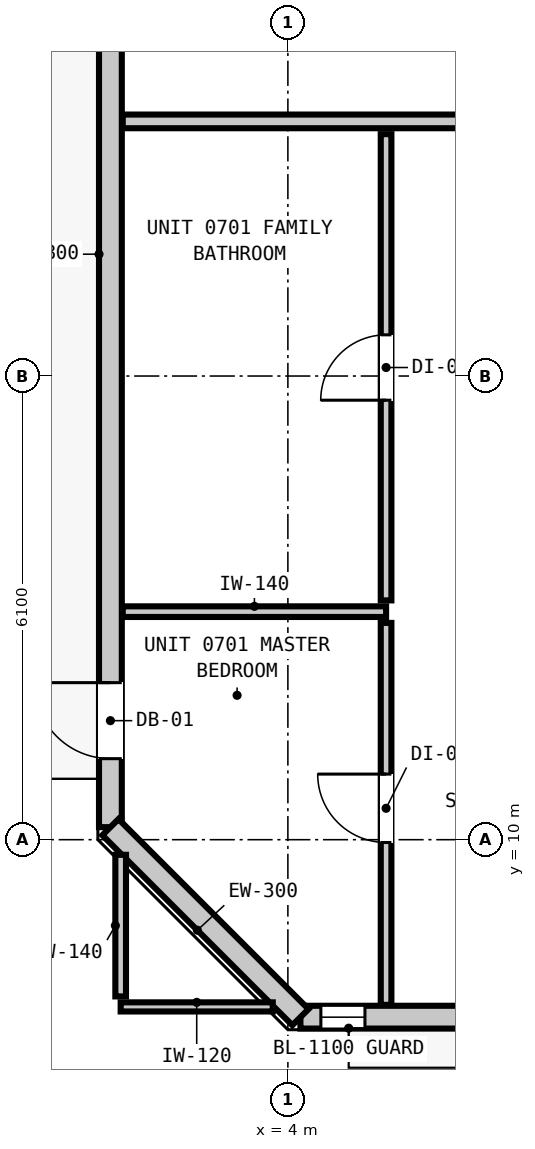
"""IFC4 building model, lengths in metres.
Left out: names, types, materials, properties, quantities, classifications, styles, units other than length and angle.
Written with IfcOpenShell. Run it as: python <this file> out.ifc"""

import sys

from ifc_helpers import new_model, si_unit, direction, frame, frame_2d, origin, place, context, subcontext, project, spatial, rectangle, extrude, element, fill, save


model = new_model("IFC4")
c1 = context("Model", 3, precision=1e-05, world=origin(), true_north=direction((0.0, 1.0)))
c2 = subcontext(c1, "Body", "Model", "MODEL_VIEW")
j1 = project(units=[si_unit("LENGTHUNIT", "METRE"), si_unit("PLANEANGLEUNIT", "RADIAN")], contexts=[c1])
p1 = place(None, origin())
s1 = spatial("IfcSite", under=j1, at=p1, CompositionType="ELEMENT")
p2 = place(p1, origin())
s2 = spatial("IfcBuilding", under=s1, at=p2, CompositionType="ELEMENT")
p3 = place(p2, frame((0.0, 0.0, 28.64)))
s3 = spatial("IfcBuildingStorey", under=s2, at=p3, CompositionType="ELEMENT", Elevation=28.64)
p4 = place(p3, frame((1.665, 10.165, 0.0), z_axis=(0.0, 0.0, 1.0), x_axis=(0.0, 1.0, 0.0)))
e1 = element("IfcWall", 1, at=p4, inside=s3, PredefinedType="STANDARD", context=c2, shape_type="SweptSolid", body=[
    extrude(rectangle(XDim=34.67, YDim=0.3, at=frame_2d((17.335, 0.0))), origin(), (0.0, 0.0, 1.0), 3.06),
])
p5 = place(p4, frame((0.901, 0.0, 0.0)))
e2 = element("IfcOpeningElement", 2, at=p5, cuts=e1, PredefinedType="OPENING", context=c2, shape_type="SweptSolid", body=[
    extrude(rectangle(XDim=1.0, YDim=2.15, at=frame_2d((0.5, 1.075))), frame((0.0, 0.16, 0.0), z_axis=(0.0, -1.0, 0.0), x_axis=(1.0, 0.0, 0.0)), (0.0, 0.0, 1.0), 0.32),
])
p6 = place(p4, frame((17.025, 0.0, 0.85)))
e3 = element("IfcOpeningElement", 3, at=p6, cuts=e1, PredefinedType="OPENING", context=c2, shape_type="SweptSolid", body=[
    extrude(rectangle(XDim=2.7, YDim=2.0, at=frame_2d((1.35, 1.0))), frame((0.0, 0.16, 0.0), z_axis=(0.0, -1.0, 0.0), x_axis=(1.0, 0.0, 0.0)), (0.0, 0.0, 1.0), 0.32),
])
p7 = place(p4, frame((13.175, 0.0, 0.85)))
e4 = element("IfcOpeningElement", 4, at=p7, cuts=e1, PredefinedType="OPENING", context=c2, shape_type="SweptSolid", body=[
    extrude(rectangle(XDim=2.7, YDim=2.0, at=frame_2d((1.35, 1.0))), frame((0.0, 0.16, 0.0), z_axis=(0.0, -1.0, 0.0), x_axis=(1.0, 0.0, 0.0)), (0.0, 0.0, 1.0), 0.32),
])
p8 = place(p4, frame((25.195, 0.0, 0.85)))
e5 = element("IfcOpeningElement", 5, at=p8, cuts=e1, PredefinedType="OPENING", context=c2, shape_type="SweptSolid", body=[
    extrude(rectangle(XDim=2.7, YDim=2.0, at=frame_2d((1.35, 1.0))), frame((0.0, 0.16, 0.0), z_axis=(0.0, -1.0, 0.0), x_axis=(1.0, 0.0, 0.0)), (0.0, 0.0, 1.0), 0.32),
])
p9 = place(p3, frame((41.635, 7.665, 0.0), z_axis=(0.0, 0.0, 1.0), x_axis=(-1.0, 0.0, 0.0)))
e6 = element("IfcWall", 6, at=p9, inside=s3, PredefinedType="STANDARD", context=c2, shape_type="SweptSolid", body=[
    extrude(rectangle(XDim=37.47, YDim=0.3, at=frame_2d((18.735, 0.0))), origin(), (0.0, 0.0, 1.0), 3.06),
])
p10 = place(p9, frame((0.901, 0.0, 0.0)))
e7 = element("IfcOpeningElement", 7, at=p10, cuts=e6, PredefinedType="OPENING", context=c2, shape_type="SweptSolid", body=[
    extrude(rectangle(XDim=1.0, YDim=2.15, at=frame_2d((0.5, 1.075))), frame((0.0, 0.16, 0.0), z_axis=(0.0, -1.0, 0.0), x_axis=(1.0, 0.0, 0.0)), (0.0, 0.0, 1.0), 0.32),
])
p11 = place(p9, frame((31.795, 0.0, 0.85)))
e8 = element("IfcOpeningElement", 8, at=p11, cuts=e6, PredefinedType="OPENING", context=c2, shape_type="SweptSolid", body=[
    extrude(rectangle(XDim=2.7, YDim=2.0, at=frame_2d((1.35, 1.0))), frame((0.0, 0.16, 0.0), z_axis=(0.0, -1.0, 0.0), x_axis=(1.0, 0.0, 0.0)), (0.0, 0.0, 1.0), 0.32),
])
p12 = place(p9, frame((36.621, 0.0, 0.85)))
e9 = element("IfcOpeningElement", 9, at=p12, cuts=e6, PredefinedType="OPENING", context=c2, shape_type="SweptSolid", body=[
    extrude(rectangle(XDim=0.58, YDim=1.5, at=frame_2d((0.29, 0.75))), frame((0.0, 0.16, 0.0), z_axis=(0.0, -1.0, 0.0), x_axis=(1.0, 0.0, 0.0)), (0.0, 0.0, 1.0), 0.32),
])
p13 = place(p9, frame((24.495, 0.0, 0.85)))
e10 = element("IfcOpeningElement", 10, at=p13, cuts=e6, PredefinedType="OPENING", context=c2, shape_type="SweptSolid", body=[
    extrude(rectangle(XDim=2.7, YDim=2.0, at=frame_2d((1.35, 1.0))), frame((0.0, 0.16, 0.0), z_axis=(0.0, -1.0, 0.0), x_axis=(1.0, 0.0, 0.0)), (0.0, 0.0, 1.0), 0.32),
])
p14 = place(p9, frame((22.221, 0.0, 0.85)))
e11 = element("IfcOpeningElement", 11, at=p14, cuts=e6, PredefinedType="OPENING", context=c2, shape_type="SweptSolid", body=[
    extrude(rectangle(XDim=1.05, YDim=1.65, at=frame_2d((0.525, 0.825))), frame((0.0, 0.16, 0.0), z_axis=(0.0, -1.0, 0.0), x_axis=(1.0, 0.0, 0.0)), (0.0, 0.0, 1.0), 0.32),
])
p15 = place(p9, frame((7.435, 0.0, 0.85)))
e12 = element("IfcOpeningElement", 12, at=p15, cuts=e6, PredefinedType="OPENING", context=c2, shape_type="SweptSolid", body=[
    extrude(rectangle(XDim=2.7, YDim=2.0, at=frame_2d((1.35, 1.0))), frame((0.0, 0.16, 0.0), z_axis=(0.0, -1.0, 0.0), x_axis=(1.0, 0.0, 0.0)), (0.0, 0.0, 1.0), 0.32),
])
p16 = place(p9, frame((15.419, 0.0, 0.85)))
e13 = element("IfcOpeningElement", 13, at=p16, cuts=e6, PredefinedType="OPENING", context=c2, shape_type="SweptSolid", body=[
    extrude(rectangle(XDim=2.7, YDim=2.0, at=frame_2d((1.35, 1.0))), frame((0.0, 0.16, 0.0), z_axis=(0.0, -1.0, 0.0), x_axis=(1.0, 0.0, 0.0)), (0.0, 0.0, 1.0), 0.32),
])
p17 = place(p3, frame((4.165, 7.665, 0.0), z_axis=(0.0, 0.0, 1.0), x_axis=(-0.707106781187, 0.707106781187, 0.0)))
e14 = element("IfcWall", 14, at=p17, inside=s3, PredefinedType="STANDARD", context=c2, shape_type="SweptSolid", body=[
    extrude(rectangle(XDim=3.536, YDim=0.3, at=frame_2d((1.768, 0.0))), origin(), (0.0, 0.0, 1.0), 3.06),
])
p18 = place(p3, frame((1.827, 19.45, 0.0), z_axis=(0.0, 0.0, 1.0), x_axis=(1.0, 0.0, 0.0)))
e15 = element("IfcWall", 15, at=p18, inside=s3, PredefinedType="PARTITIONING", context=c2, shape_type="SweptSolid", body=[
    extrude(rectangle(XDim=42.146, YDim=0.18, at=frame_2d((21.073, 0.0))), origin(), (0.0, 0.0, 1.0), 3.06),
])
p19 = place(p18, frame((8.602, 0.0, 0.0)))
e16 = element("IfcOpeningElement", 16, at=p19, cuts=e15, PredefinedType="OPENING", context=c2, shape_type="SweptSolid", body=[
    extrude(rectangle(XDim=1.0, YDim=2.15, at=frame_2d((0.5, 1.075))), frame((0.0, 0.1, 0.0), z_axis=(0.0, -1.0, 0.0), x_axis=(1.0, 0.0, 0.0)), (0.0, 0.0, 1.0), 0.2),
])
p20 = place(p18, frame((30.475, 0.0, 0.0)))
e17 = element("IfcOpeningElement", 17, at=p20, cuts=e15, PredefinedType="OPENING", context=c2, shape_type="SweptSolid", body=[
    extrude(rectangle(XDim=1.0, YDim=2.15, at=frame_2d((0.5, 1.075))), frame((0.0, 0.1, 0.0), z_axis=(0.0, -1.0, 0.0), x_axis=(1.0, 0.0, 0.0)), (0.0, 0.0, 1.0), 0.2),
])
p21 = place(p3, frame((1.827, 13.0, 0.0), z_axis=(0.0, 0.0, 1.0), x_axis=(1.0, 0.0, 0.0)))
e18 = element("IfcWall", 18, at=p21, inside=s3, PredefinedType="PARTITIONING", context=c2, shape_type="SweptSolid", body=[
    extrude(rectangle(XDim=3.465, YDim=0.14, at=frame_2d((1.732, 0.0))), origin(), (0.0, 0.0, 1.0), 3.06),
])
p22 = place(p3, frame((1.8, 7.8, 0.0), z_axis=(0.0, 0.0, 1.0), x_axis=(1.0, 0.0, 0.0)))
e19 = element("IfcWall", 19, at=p22, inside=s3, PredefinedType="PARTITIONING", context=c2, shape_type="SweptSolid", body=[
    extrude(rectangle(XDim=2.001, YDim=0.12, at=frame_2d((1.0, 0.0))), origin(), (0.0, 0.0, 1.0), 3.06),
])
p23 = place(p3, frame((1.8, 7.938, 0.0), z_axis=(0.0, 0.0, 1.0), x_axis=(0.0, 1.0, 0.0)))
e20 = element("IfcWall", 20, at=p23, inside=s3, PredefinedType="PARTITIONING", context=c2, shape_type="SweptSolid", body=[
    extrude(rectangle(XDim=1.863, YDim=0.14, at=frame_2d((0.932, 0.0))), origin(), (0.0, 0.0, 1.0), 3.06),
])
p24 = place(p3, frame((5.292, 7.827, 0.0), z_axis=(0.0, 0.0, 1.0), x_axis=(0.0, 1.0, 0.0)))
e21 = element("IfcWall", 21, at=p24, inside=s3, PredefinedType="PARTITIONING", context=c2, shape_type="SweptSolid", body=[
    extrude(rectangle(XDim=5.025, YDim=0.14, at=frame_2d((2.513, 0.0))), origin(), (0.0, 0.0, 1.0), 3.06),
])
p25 = place(p24, frame((2.136, 0.0, 0.0)))
e22 = element("IfcOpeningElement", 22, at=p25, cuts=e21, PredefinedType="OPENING", context=c2, shape_type="SweptSolid", body=[
    extrude(rectangle(XDim=0.9, YDim=2.1, at=frame_2d((0.45, 1.05))), frame((0.0, 0.08, 0.0), z_axis=(0.0, -1.0, 0.0), x_axis=(1.0, 0.0, 0.0)), (0.0, 0.0, 1.0), 0.16),
])
p26 = place(p3, frame((5.292, 13.148, 0.0), z_axis=(0.0, 0.0, 1.0), x_axis=(0.0, 1.0, 0.0)))
e23 = element("IfcWall", 23, at=p26, inside=s3, PredefinedType="PARTITIONING", context=c2, shape_type="SweptSolid", body=[
    extrude(rectangle(XDim=6.134, YDim=0.14, at=frame_2d((3.067, 0.0))), origin(), (0.0, 0.0, 1.0), 3.06),
])
p27 = place(p26, frame((2.634, 0.0, 0.0)))
e24 = element("IfcOpeningElement", 24, at=p27, cuts=e23, PredefinedType="OPENING", context=c2, shape_type="SweptSolid", body=[
    extrude(rectangle(XDim=0.86, YDim=2.02, at=frame_2d((0.43, 1.01))), frame((0.0, 0.08, 0.0), z_axis=(0.0, -1.0, 0.0), x_axis=(1.0, 0.0, 0.0)), (0.0, 0.0, 1.0), 0.16),
])
p28 = place(p5, origin())
e25 = element("IfcDoor", 25, at=p28, inside=s3, OperationType="SINGLE_SWING_RIGHT", PredefinedType="DOOR", context=c2, shape_type="SweptSolid", body=[
    extrude(rectangle(XDim=1.0, YDim=2.15, at=frame_2d((0.5, 1.075))), frame((0.0, 0.025, 0.0), z_axis=(0.0, -1.0, 0.0), x_axis=(1.0, 0.0, 0.0)), (0.0, 0.0, 1.0), 0.05),
])
fill(e2, e25)
p29 = place(p12, origin())
e26 = element("IfcWindow", 26, at=p29, inside=s3, PartitioningType="SINGLE_PANEL", PredefinedType="WINDOW", context=c2, shape_type="SweptSolid", body=[
    extrude(rectangle(XDim=0.58, YDim=1.5, at=frame_2d((0.29, 0.75))), frame((0.0, 0.03, 0.0), z_axis=(0.0, -1.0, 0.0), x_axis=(1.0, 0.0, 0.0)), (0.0, 0.0, 1.0), 0.06),
])
fill(e9, e26)
p30 = place(p27, origin())
e27 = element("IfcDoor", 27, at=p30, inside=s3, OperationType="SINGLE_SWING_LEFT", PredefinedType="DOOR", context=c2, shape_type="SweptSolid", body=[
    extrude(rectangle(XDim=0.86, YDim=2.02, at=frame_2d((0.43, 1.01))), frame((0.0, 0.025, 0.0), z_axis=(0.0, -1.0, 0.0), x_axis=(1.0, 0.0, 0.0)), (0.0, 0.0, 1.0), 0.05),
])
fill(e24, e27)
p31 = place(p25, origin())
e28 = element("IfcDoor", 28, at=p31, inside=s3, OperationType="SINGLE_SWING_RIGHT", PredefinedType="DOOR", context=c2, shape_type="SweptSolid", body=[
    extrude(rectangle(XDim=0.9, YDim=2.1, at=frame_2d((0.45, 1.05))), frame((0.0, 0.025, 0.0), z_axis=(0.0, -1.0, 0.0), x_axis=(1.0, 0.0, 0.0)), (0.0, 0.0, 1.0), 0.05),
])
fill(e22, e28)
save(model, sys.argv[1])
